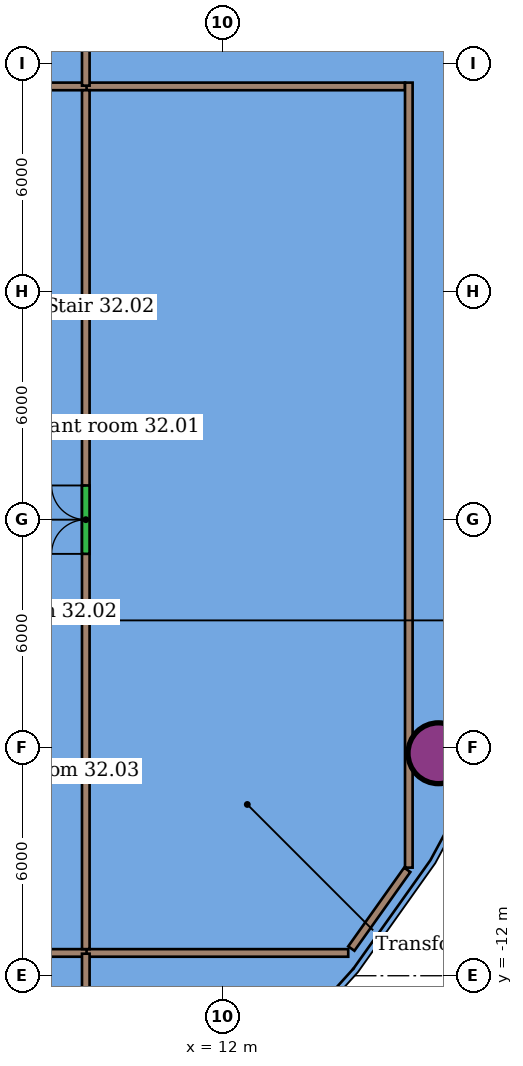
"""IFC4 building model, lengths in metres.
Left out: names, types, materials, properties, quantities, classifications, styles, units other than length and angle.
Written with IfcOpenShell. Run it as: python <this file> out.ifc"""

import sys

from ifc_helpers import new_model, si_unit, direction, frame, frame_2d, origin, origin_2d, place, context, subcontext, project, spatial, rectangle, hollow_circle, extrude, element, fill, save


model = new_model("IFC4")
c1 = context("Model", 3, precision=1e-05, world=origin(), true_north=direction((0.0, 1.0)))
c2 = subcontext(c1, "Body", "Model", "MODEL_VIEW")
j1 = project(units=[si_unit("LENGTHUNIT", "METRE"), si_unit("PLANEANGLEUNIT", "RADIAN")], contexts=[c1])
p1 = place(None, origin())
s1 = spatial("IfcSite", under=j1, at=p1, CompositionType="ELEMENT")
p2 = place(p1, origin())
s2 = spatial("IfcBuilding", under=s1, at=p2, CompositionType="ELEMENT")
p3 = place(p2, frame((0.0, 0.0, 135.4)))
s3 = spatial("IfcBuildingStorey", under=s2, at=p3, CompositionType="ELEMENT", Elevation=135.4)
p4 = place(p3, frame((17.679, -6.146, 0.0), z_axis=(0.0, 0.0, 1.0), x_axis=(1.0, 0.0, 0.0)))
e1 = element("IfcColumn", 1, at=p4, inside=s3, PredefinedType="COLUMN", context=c2, shape_type="SweptSolid", body=[
    extrude(hollow_circle(Radius=0.8, WallThickness=0.055, at=origin_2d()), origin(), (0.0, 0.0, 1.0), 7.85),
])
p5 = place(p3, frame((8.5, 11.4, 0.0), z_axis=(0.0, 0.0, 1.0), x_axis=(-1.0, 0.0, 0.0)))
e2 = element("IfcWall", 2, at=p5, inside=s3, PredefinedType="PARTITIONING", context=c2, shape_type="SweptSolid", body=[
    extrude(rectangle(XDim=29.0, YDim=0.2, at=frame_2d((14.5, 0.0))), origin(), (0.0, 0.0, 1.0), 7.262),
])
p6 = place(p5, frame((23.5, 0.0, 0.0)))
e3 = element("IfcOpeningElement", 3, at=p6, cuts=e2, PredefinedType="OPENING", context=c2, shape_type="SweptSolid", body=[
    extrude(rectangle(XDim=1.8, YDim=2.4, at=frame_2d((0.9, 1.2))), frame((0.0, 0.11, 0.0), z_axis=(0.0, -1.0, 0.0), x_axis=(1.0, 0.0, 0.0)), (0.0, 0.0, 1.0), 0.22),
])
p7 = place(p5, frame((14.15, 0.0, 0.0)))
e4 = element("IfcOpeningElement", 4, at=p7, cuts=e2, PredefinedType="OPENING", context=c2, shape_type="SweptSolid", body=[
    extrude(rectangle(XDim=1.0, YDim=2.1, at=frame_2d((0.5, 1.05))), frame((0.0, 0.11, 0.0), z_axis=(0.0, -1.0, 0.0), x_axis=(1.0, 0.0, 0.0)), (0.0, 0.0, 1.0), 0.22),
])
p8 = place(p5, frame((1.1, 0.0, 0.0)))
e5 = element("IfcOpeningElement", 5, at=p8, cuts=e2, PredefinedType="OPENING", context=c2, shape_type="SweptSolid", body=[
    extrude(rectangle(XDim=1.8, YDim=2.4, at=frame_2d((0.9, 1.2))), frame((0.0, 0.11, 0.0), z_axis=(0.0, -1.0, 0.0), x_axis=(1.0, 0.0, 0.0)), (0.0, 0.0, 1.0), 0.22),
])
p9 = place(p3, frame((8.42, 11.4, 0.0), z_axis=(0.0, 0.0, 1.0), x_axis=(1.0, 0.0, 0.0)))
e6 = element("IfcWall", 6, at=p9, inside=s3, PredefinedType="PARTITIONING", context=c2, shape_type="SweptSolid", body=[
    extrude(rectangle(XDim=8.38, YDim=0.2, at=frame_2d((4.19, 0.0))), origin(), (0.0, 0.0, 1.0), 7.262),
])
p10 = place(p3, frame((-20.5, -11.4, 0.0), z_axis=(0.0, 0.0, 1.0), x_axis=(1.0, 0.0, 0.0)))
e7 = element("IfcWall", 7, at=p10, inside=s3, PredefinedType="PARTITIONING", context=c2, shape_type="SweptSolid", body=[
    extrude(rectangle(XDim=29.0, YDim=0.2, at=frame_2d((14.5, 0.0))), origin(), (0.0, 0.0, 1.0), 7.262),
])
p11 = place(p10, frame((1.122, 0.0, 0.0)))
e8 = element("IfcOpeningElement", 8, at=p11, cuts=e7, PredefinedType="OPENING", context=c2, shape_type="SweptSolid", body=[
    extrude(rectangle(XDim=1.8, YDim=2.4, at=frame_2d((0.9, 1.2))), frame((0.0, 0.11, 0.0), z_axis=(0.0, -1.0, 0.0), x_axis=(1.0, 0.0, 0.0)), (0.0, 0.0, 1.0), 0.22),
])
p12 = place(p10, frame((14.1, 0.0, 0.0)))
e9 = element("IfcOpeningElement", 9, at=p12, cuts=e7, PredefinedType="OPENING", context=c2, shape_type="SweptSolid", body=[
    extrude(rectangle(XDim=1.0, YDim=2.1, at=frame_2d((0.5, 1.05))), frame((0.0, 0.11, 0.0), z_axis=(0.0, -1.0, 0.0), x_axis=(1.0, 0.0, 0.0)), (0.0, 0.0, 1.0), 0.22),
])
p13 = place(p10, frame((23.1, 0.0, 0.0)))
e10 = element("IfcOpeningElement", 10, at=p13, cuts=e7, PredefinedType="OPENING", context=c2, shape_type="SweptSolid", body=[
    extrude(rectangle(XDim=1.8, YDim=2.4, at=frame_2d((0.9, 1.2))), frame((0.0, 0.11, 0.0), z_axis=(0.0, -1.0, 0.0), x_axis=(1.0, 0.0, 0.0)), (0.0, 0.0, 1.0), 0.22),
])
p14 = place(p3, frame((8.42, -11.4, 0.0), z_axis=(0.0, 0.0, 1.0), x_axis=(1.0, 0.0, 0.0)))
e11 = element("IfcWall", 11, at=p14, inside=s3, PredefinedType="PARTITIONING", context=c2, shape_type="SweptSolid", body=[
    extrude(rectangle(XDim=6.886, YDim=0.2, at=frame_2d((3.443, 0.0))), origin(), (0.0, 0.0, 1.0), 7.262),
])
p15 = place(p3, frame((8.4, -17.799, 0.0), z_axis=(0.0, 0.0, 1.0), x_axis=(0.0, 1.0, 0.0)))
e12 = element("IfcWall", 12, at=p15, inside=s3, PredefinedType="PARTITIONING", context=c2, shape_type="SweptSolid", body=[
    extrude(rectangle(XDim=6.379, YDim=0.2, at=frame_2d((3.19, 0.0))), origin(), (0.0, 0.0, 1.0), 7.262),
])
p16 = place(p3, frame((8.4, -11.3, 0.0), z_axis=(0.0, 0.0, 1.0), x_axis=(0.0, 1.0, 0.0)))
e13 = element("IfcWall", 13, at=p16, inside=s3, PredefinedType="PARTITIONING", context=c2, shape_type="SweptSolid", body=[
    extrude(rectangle(XDim=22.6, YDim=0.2, at=frame_2d((11.3, 0.0))), origin(), (0.0, 0.0, 1.0), 7.262),
])
p17 = place(p16, frame((10.4, 0.0, 0.0)))
e14 = element("IfcOpeningElement", 14, at=p17, cuts=e13, PredefinedType="OPENING", context=c2, shape_type="SweptSolid", body=[
    extrude(rectangle(XDim=1.8, YDim=2.4, at=frame_2d((0.9, 1.2))), frame((0.0, 0.11, 0.0), z_axis=(0.0, -1.0, 0.0), x_axis=(1.0, 0.0, 0.0)), (0.0, 0.0, 1.0), 0.22),
])
p18 = place(p3, frame((8.4, 11.42, 0.0), z_axis=(0.0, 0.0, 1.0), x_axis=(0.0, 1.0, 0.0)))
e15 = element("IfcWall", 15, at=p18, inside=s3, PredefinedType="PARTITIONING", context=c2, shape_type="SweptSolid", body=[
    extrude(rectangle(XDim=8.38, YDim=0.2, at=frame_2d((4.19, 0.0))), origin(), (0.0, 0.0, 1.0), 7.262),
])
p19 = place(p3, frame((16.9, -9.155, 0.0), z_axis=(0.0, 0.0, 1.0), x_axis=(0.0, 1.0, 0.0)))
e16 = element("IfcWall", 16, at=p19, inside=s3, PredefinedType="PARTITIONING", context=c2, shape_type="SweptSolid", body=[
    extrude(rectangle(XDim=20.655, YDim=0.2, at=frame_2d((10.328, 0.0))), origin(), (0.0, 0.0, 1.0), 7.262),
])
p20 = place(p3, frame((15.388, -11.285, 0.0), z_axis=(0.0, 0.0, 1.0), x_axis=(0.578936610042, 0.815372553838, 0.0)))
e17 = element("IfcWall", 17, at=p20, inside=s3, PredefinedType="PARTITIONING", context=c2, shape_type="SweptSolid", body=[
    extrude(rectangle(XDim=2.541, YDim=0.2, at=frame_2d((1.271, 0.0))), origin(), (0.0, 0.0, 1.0), 7.262),
])
p21 = place(p17, origin())
e18 = element("IfcDoor", 18, at=p21, inside=s3, OperationType="DOUBLE_DOOR_SINGLE_SWING", PredefinedType="DOOR", context=c2, shape_type="SweptSolid", body=[
    extrude(rectangle(XDim=1.8, YDim=2.4, at=frame_2d((0.9, 1.2))), frame((0.0, 0.025, 0.0), z_axis=(0.0, -1.0, 0.0), x_axis=(1.0, 0.0, 0.0)), (0.0, 0.0, 1.0), 0.05),
])
fill(e14, e18)
save(model, sys.argv[1])
